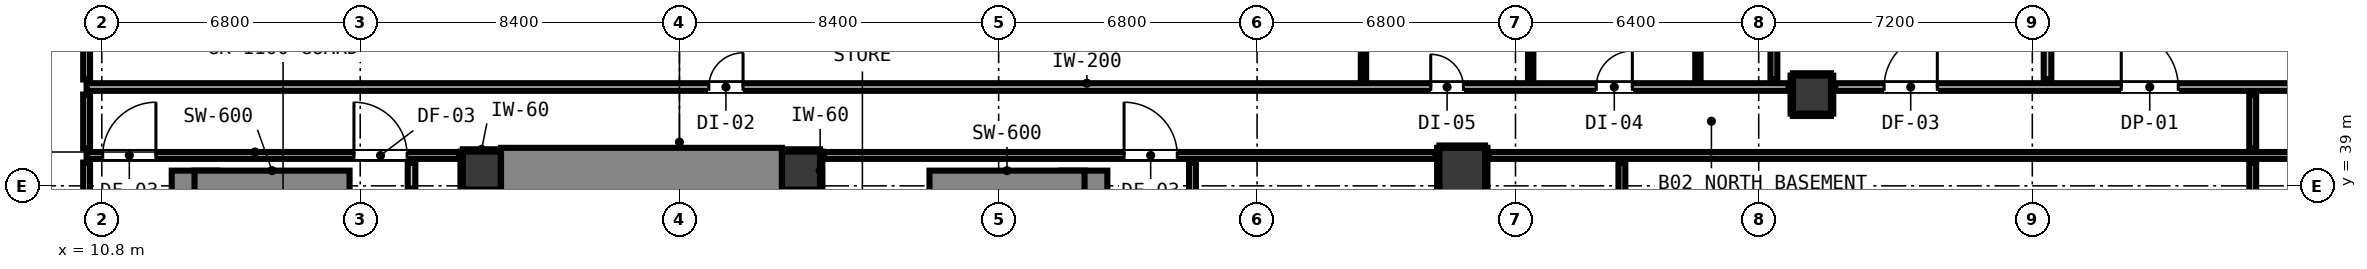
"""IFC4 building model, lengths in metres.
Left out: names, types, materials, properties, quantities, classifications, styles, units other than length and angle.
Written with IfcOpenShell. Run it as: python <this file> out.ifc"""

import sys

from ifc_helpers import new_model, si_unit, direction, frame, frame_2d, origin, origin_2d, place, context, subcontext, project, spatial, rectangle, circle, extrude, element, fill, save


model = new_model("IFC4")
c1 = context("Model", 3, precision=1e-05, world=origin(), true_north=direction((0.0, 1.0)))
c2 = subcontext(c1, "Body", "Model", "MODEL_VIEW")
j1 = project(units=[si_unit("LENGTHUNIT", "METRE"), si_unit("PLANEANGLEUNIT", "RADIAN")], contexts=[c1])
p1 = place(None, origin())
s1 = spatial("IfcSite", under=j1, at=p1, CompositionType="ELEMENT")
p2 = place(p1, origin())
s2 = spatial("IfcBuilding", under=s1, at=p2, CompositionType="ELEMENT")
p3 = place(p2, frame((0.0, 0.0, -8.8)))
s3 = spatial("IfcBuildingStorey", under=s2, at=p3, CompositionType="ELEMENT", Elevation=-8.8)
for number, where, z_axis, x_axis in (
    (1, (20.8, 39.4, 0.0), (0.0, 0.0, 1.0), (1.0, 0.0, 0.0)),
    (2, (29.2, 39.4, 0.0), (0.0, 0.0, 1.0), (1.0, 0.0, 0.0)),
):
    element("IfcColumn", number, at=place(p3, frame(where, z_axis=z_axis, x_axis=x_axis)), inside=s3, PredefinedType="COLUMN", context=c2, shape_type="SweptSolid", body=[
        extrude(rectangle(XDim=1.0, YDim=1.0, at=origin_2d()), origin(), (0.0, 0.0, 1.0), 4.4),
    ])
p4 = place(p3, frame((13.24, 31.205, 0.0), z_axis=(0.0, 0.0, 1.0), x_axis=(0.0, 1.0, 0.0)))
e3 = element("IfcWall", 3, at=p4, inside=s3, PredefinedType="SHEAR", context=c2, shape_type="SweptSolid", body=[
    extrude(rectangle(XDim=8.195, YDim=1.2, at=frame_2d((4.097, 0.0))), origin(), (0.0, 0.0, 1.0), 4.4),
])
p5 = place(p3, frame((13.24, 39.1, 0.0), z_axis=(0.0, 0.0, 1.0), x_axis=(1.0, 0.0, 0.0)))
e4 = element("IfcWall", 4, at=p5, inside=s3, PredefinedType="SHEAR", context=c2, shape_type="SweptSolid", body=[
    extrude(rectangle(XDim=4.08, YDim=0.6, at=frame_2d((2.04, 0.0))), origin(), (0.0, 0.0, 1.0), 4.4),
])
p6 = place(p3, frame((36.66, 31.205, 0.0), z_axis=(0.0, 0.0, 1.0), x_axis=(0.0, 1.0, 0.0)))
e5 = element("IfcWall", 5, at=p6, inside=s3, PredefinedType="SHEAR", context=c2, shape_type="SweptSolid", body=[
    extrude(rectangle(XDim=8.195, YDim=1.2, at=frame_2d((4.097, 0.0))), origin(), (0.0, 0.0, 1.0), 4.4),
])
p7 = place(p3, frame((32.58, 39.1, 0.0), z_axis=(0.0, 0.0, 1.0), x_axis=(1.0, 0.0, 0.0)))
e6 = element("IfcWall", 6, at=p7, inside=s3, PredefinedType="SHEAR", context=c2, shape_type="SweptSolid", body=[
    extrude(rectangle(XDim=4.08, YDim=0.6, at=frame_2d((2.04, 0.0))), origin(), (0.0, 0.0, 1.0), 4.4),
])
p8 = place(p3, frame((21.305, 39.4, 0.0), z_axis=(0.0, 0.0, 1.0), x_axis=(1.0, 0.0, 0.0)))
e7 = element("IfcWall", 7, at=p8, inside=s3, PredefinedType="SHEAR", context=c2, shape_type="SweptSolid", body=[
    extrude(rectangle(XDim=7.39, YDim=1.2, at=frame_2d((3.695, 0.0))), origin(), (0.0, 0.0, 1.0), 4.4),
])
p9 = place(p3, frame((46.6, 39.4, 0.0), z_axis=(0.0, 0.0, 1.0), x_axis=(1.0, 0.0, 0.0)))
e8 = element("IfcColumn", 8, at=p9, inside=s3, PredefinedType="COLUMN", context=c2, shape_type="SweptSolid", body=[
    extrude(circle(Radius=0.6, at=origin_2d()), origin(), (0.0, 0.0, 1.0), 4.4),
])
p10 = place(p3, frame((55.8, 41.4, 0.0), z_axis=(0.0, 0.0, 1.0), x_axis=(1.0, 0.0, 0.0)))
e9 = element("IfcColumn", 9, at=p10, inside=s3, PredefinedType="COLUMN", context=c2, shape_type="SweptSolid", body=[
    extrude(rectangle(XDim=1.0, YDim=1.0, at=origin_2d()), origin(), (0.0, 0.0, 1.0), 4.4),
])
p11 = place(p3, frame((10.4, 41.6, 0.0), z_axis=(0.0, 0.0, 1.0), x_axis=(1.0, 0.0, 0.0)))
e10 = element("IfcWall", 10, at=p11, inside=s3, PredefinedType="PARTITIONING", context=c2, shape_type="SweptSolid", body=[
    extrude(rectangle(XDim=44.788, YDim=0.2, at=frame_2d((22.394, 0.0))), origin(), (0.0, 0.0, 1.0), 4.1),
])
p12 = place(p11, frame((16.374, 0.0, 0.0)))
e11 = element("IfcOpeningElement", 11, at=p12, cuts=e10, PredefinedType="OPENING", context=c2, shape_type="SweptSolid", body=[
    extrude(rectangle(XDim=0.9, YDim=2.1, at=frame_2d((0.45, 1.05))), frame((0.0, 0.11, 0.0), z_axis=(0.0, -1.0, 0.0), x_axis=(1.0, 0.0, 0.0)), (0.0, 0.0, 1.0), 0.22),
])
p13 = place(p11, frame((35.37, 0.0, 0.0)))
e12 = element("IfcOpeningElement", 12, at=p13, cuts=e10, PredefinedType="OPENING", context=c2, shape_type="SweptSolid", body=[
    extrude(rectangle(XDim=0.86, YDim=2.02, at=frame_2d((0.43, 1.01))), frame((0.0, 0.11, 0.0), z_axis=(0.0, -1.0, 0.0), x_axis=(1.0, 0.0, 0.0)), (0.0, 0.0, 1.0), 0.22),
])
p14 = place(p11, frame((39.725, 0.0, 0.0)))
e13 = element("IfcOpeningElement", 13, at=p14, cuts=e10, PredefinedType="OPENING", context=c2, shape_type="SweptSolid", body=[
    extrude(rectangle(XDim=0.95, YDim=2.1, at=frame_2d((0.475, 1.05))), frame((0.0, 0.11, 0.0), z_axis=(0.0, -1.0, 0.0), x_axis=(1.0, 0.0, 0.0)), (0.0, 0.0, 1.0), 0.22),
])
p15 = place(p3, frame((56.412, 41.6, 0.0), z_axis=(0.0, 0.0, 1.0), x_axis=(1.0, 0.0, 0.0)))
e14 = element("IfcWall", 14, at=p15, inside=s3, PredefinedType="PARTITIONING", context=c2, shape_type="SweptSolid", body=[
    extrude(rectangle(XDim=24.776, YDim=0.2, at=frame_2d((12.388, 0.0))), origin(), (0.0, 0.0, 1.0), 4.1),
])
p16 = place(p15, frame((1.288, 0.0, 0.0)))
e15 = element("IfcOpeningElement", 15, at=p16, cuts=e14, PredefinedType="OPENING", context=c2, shape_type="SweptSolid", body=[
    extrude(rectangle(XDim=1.4, YDim=2.15, at=frame_2d((0.7, 1.075))), frame((0.0, 0.11, 0.0), z_axis=(0.0, -1.0, 0.0), x_axis=(1.0, 0.0, 0.0)), (0.0, 0.0, 1.0), 0.22),
])
p17 = place(p15, frame((7.528, 0.0, 0.0)))
e16 = element("IfcOpeningElement", 16, at=p17, cuts=e14, PredefinedType="OPENING", context=c2, shape_type="SweptSolid", body=[
    extrude(rectangle(XDim=1.5, YDim=2.15, at=frame_2d((0.75, 1.075))), frame((0.0, 0.11, 0.0), z_axis=(0.0, -1.0, 0.0), x_axis=(1.0, 0.0, 0.0)), (0.0, 0.0, 1.0), 0.22),
])
p18 = place(p3, frame((10.4, 39.8, 0.0), z_axis=(0.0, 0.0, 1.0), x_axis=(1.0, 0.0, 0.0)))
e17 = element("IfcWall", 17, at=p18, inside=s3, PredefinedType="PARTITIONING", context=c2, shape_type="SweptSolid", body=[
    extrude(rectangle(XDim=9.798, YDim=0.18, at=frame_2d((4.899, 0.0))), origin(), (0.0, 0.0, 1.0), 3.335),
])
p19 = place(p18, frame((7.035, 0.0, 0.0)))
e18 = element("IfcOpeningElement", 18, at=p19, cuts=e17, PredefinedType="OPENING", context=c2, shape_type="SweptSolid", body=[
    extrude(rectangle(XDim=1.4, YDim=2.15, at=frame_2d((0.7, 1.075))), frame((0.0, 0.1, 0.0), z_axis=(0.0, -1.0, 0.0), x_axis=(1.0, 0.0, 0.0)), (0.0, 0.0, 1.0), 0.2),
])
p20 = place(p18, frame((0.424, 0.0, 0.0)))
e19 = element("IfcOpeningElement", 19, at=p20, cuts=e17, PredefinedType="OPENING", context=c2, shape_type="SweptSolid", body=[
    extrude(rectangle(XDim=1.4, YDim=2.15, at=frame_2d((0.7, 1.075))), frame((0.0, 0.1, 0.0), z_axis=(0.0, -1.0, 0.0), x_axis=(1.0, 0.0, 0.0)), (0.0, 0.0, 1.0), 0.2),
])
p21 = place(p3, frame((29.802, 39.8, 0.0), z_axis=(0.0, 0.0, 1.0), x_axis=(1.0, 0.0, 0.0)))
e20 = element("IfcWall", 20, at=p21, inside=s3, PredefinedType="PARTITIONING", context=c2, shape_type="SweptSolid", body=[
    extrude(rectangle(XDim=16.096, YDim=0.18, at=frame_2d((8.048, 0.0))), origin(), (0.0, 0.0, 1.0), 3.335),
])
p22 = place(p21, frame((7.898, 0.0, 0.0)))
e21 = element("IfcOpeningElement", 21, at=p22, cuts=e20, PredefinedType="OPENING", context=c2, shape_type="SweptSolid", body=[
    extrude(rectangle(XDim=1.4, YDim=2.15, at=frame_2d((0.7, 1.075))), frame((0.0, 0.1, 0.0), z_axis=(0.0, -1.0, 0.0), x_axis=(1.0, 0.0, 0.0)), (0.0, 0.0, 1.0), 0.2),
])
p23 = place(p3, frame((47.302, 39.8, 0.0), z_axis=(0.0, 0.0, 1.0), x_axis=(1.0, 0.0, 0.0)))
e22 = element("IfcWall", 22, at=p23, inside=s3, PredefinedType="PARTITIONING", context=c2, shape_type="SweptSolid", body=[
    extrude(rectangle(XDim=23.098, YDim=0.18, at=frame_2d((11.549, 0.0))), origin(), (0.0, 0.0, 1.0), 4.1),
])
p24 = place(p3, frame((18.95, 38.928, 0.0), z_axis=(0.0, 0.0, 1.0), x_axis=(0.0, 1.0, 0.0)))
e23 = element("IfcWall", 23, at=p24, inside=s3, PredefinedType="PARTITIONING", context=c2, shape_type="SweptSolid", body=[
    extrude(rectangle(XDim=0.674, YDim=0.2, at=frame_2d((0.337, 0.0))), origin(), (0.0, 0.0, 1.0), 4.1),
])
p25 = place(p3, frame((62.0, 41.808, 0.0), z_axis=(0.0, 0.0, 1.0), x_axis=(0.0, 1.0, 0.0)))
e24 = element("IfcWall", 24, at=p25, inside=s3, PredefinedType="PARTITIONING", context=c2, shape_type="SweptSolid", body=[
    extrude(rectangle(XDim=2.442, YDim=0.2, at=frame_2d((1.221, 0.0))), origin(), (0.0, 0.0, 1.0), 4.1),
])
p26 = place(p3, frame((10.4, 21.818, 0.0), z_axis=(0.0, 0.0, 1.0), x_axis=(0.0, 1.0, 0.0)))
e25 = element("IfcWall", 25, at=p26, inside=s3, PredefinedType="PARTITIONING", context=c2, shape_type="SweptSolid", body=[
    extrude(rectangle(XDim=17.794, YDim=0.18, at=frame_2d((8.897, 0.0))), origin(), (0.0, 0.0, 1.0), 4.1),
])
p27 = place(p3, frame((10.4, 39.988, 0.0), z_axis=(0.0, 0.0, 1.0), x_axis=(0.0, 1.0, 0.0)))
e26 = element("IfcWall", 26, at=p27, inside=s3, PredefinedType="PARTITIONING", context=c2, shape_type="SweptSolid", body=[
    extrude(rectangle(XDim=1.414, YDim=0.18, at=frame_2d((0.707, 0.0))), origin(), (0.0, 0.0, 1.0), 4.1),
])
p28 = place(p3, frame((10.4, 41.798, 0.0), z_axis=(0.0, 0.0, 1.0), x_axis=(0.0, 1.0, 0.0)))
e27 = element("IfcWall", 27, at=p28, inside=s3, PredefinedType="PARTITIONING", context=c2, shape_type="SweptSolid", body=[
    extrude(rectangle(XDim=15.844, YDim=0.18, at=frame_2d((7.922, 0.0))), origin(), (0.0, 0.0, 1.0), 4.1),
])
p29 = place(p3, frame((39.5, 21.818, 0.0), z_axis=(0.0, 0.0, 1.0), x_axis=(0.0, 1.0, 0.0)))
e28 = element("IfcWall", 28, at=p29, inside=s3, PredefinedType="PARTITIONING", context=c2, shape_type="SweptSolid", body=[
    extrude(rectangle(XDim=17.794, YDim=0.18, at=frame_2d((8.897, 0.0))), origin(), (0.0, 0.0, 1.0), 4.1),
])
p30 = place(p3, frame((50.8, 36.798, 0.0), z_axis=(0.0, 0.0, 1.0), x_axis=(0.0, 1.0, 0.0)))
e29 = element("IfcWall", 29, at=p30, inside=s3, PredefinedType="PARTITIONING", context=c2, shape_type="SweptSolid", body=[
    extrude(rectangle(XDim=2.814, YDim=0.18, at=frame_2d((1.407, 0.0))), origin(), (0.0, 0.0, 1.0), 4.1),
])
p31 = place(p3, frame((54.8, 41.798, 0.0), z_axis=(0.0, 0.0, 1.0), x_axis=(0.0, 1.0, 0.0)))
e30 = element("IfcWall", 30, at=p31, inside=s3, PredefinedType="PARTITIONING", context=c2, shape_type="SweptSolid", body=[
    extrude(rectangle(XDim=2.534, YDim=0.18, at=frame_2d((1.267, 0.0))), origin(), (0.0, 0.0, 1.0), 4.1),
])
p32 = place(p3, frame((67.4, 21.818, 0.0), z_axis=(0.0, 0.0, 1.0), x_axis=(0.0, 1.0, 0.0)))
e31 = element("IfcWall", 31, at=p32, inside=s3, PredefinedType="PARTITIONING", context=c2, shape_type="SweptSolid", body=[
    extrude(rectangle(XDim=17.794, YDim=0.18, at=frame_2d((8.897, 0.0))), origin(), (0.0, 0.0, 1.0), 4.1),
])
p33 = place(p3, frame((67.4, 39.988, 0.0), z_axis=(0.0, 0.0, 1.0), x_axis=(0.0, 1.0, 0.0)))
e32 = element("IfcWall", 32, at=p33, inside=s3, PredefinedType="PARTITIONING", context=c2, shape_type="SweptSolid", body=[
    extrude(rectangle(XDim=1.414, YDim=0.18, at=frame_2d((0.707, 0.0))), origin(), (0.0, 0.0, 1.0), 4.1),
])
for number, where, z_axis, x_axis in (
    (33, (44.0, 41.778, 0.0), (0.0, 0.0, 1.0), (0.0, 1.0, 0.0)),
    (34, (48.4, 41.778, 0.0), (0.0, 0.0, 1.0), (0.0, 1.0, 0.0)),
    (35, (52.8, 41.778, 0.0), (0.0, 0.0, 1.0), (0.0, 1.0, 0.0)),
):
    element("IfcWall", number, at=place(p3, frame(where, z_axis=z_axis, x_axis=x_axis)), inside=s3, PredefinedType="PARTITIONING", context=c2, shape_type="SweptSolid", body=[
        extrude(rectangle(XDim=4.274, YDim=0.14, at=frame_2d((2.137, 0.0))), origin(), (0.0, 0.0, 1.0), 4.1),
    ])
for number, where, z_axis, x_axis in (
    (36, (20.3, 38.868, 0.0), (0.0, 0.0, 1.0), (1.0, 0.0, 0.0)),
    (37, (20.3, 39.932, 0.0), (0.0, 0.0, 1.0), (1.0, 0.0, 0.0)),
):
    element("IfcWall", number, at=place(p3, frame(where, z_axis=z_axis, x_axis=x_axis)), inside=s3, PredefinedType="PARTITIONING", context=c2, shape_type="SweptSolid", body=[
        extrude(rectangle(XDim=0.99, YDim=0.06, at=frame_2d((0.495, 0.0))), origin(), (0.0, 0.0, 1.0), 1.45),
    ])
p34 = place(p3, frame((20.268, 38.9, 0.0), z_axis=(0.0, 0.0, 1.0), x_axis=(0.0, 1.0, 0.0)))
e38 = element("IfcWall", 38, at=p34, inside=s3, PredefinedType="PARTITIONING", context=c2, shape_type="SweptSolid", body=[
    extrude(rectangle(XDim=1.0, YDim=0.06, at=frame_2d((0.5, 0.0))), origin(), (0.0, 0.0, 1.0), 1.45),
])
for number, where, z_axis, x_axis in (
    (39, (28.71, 38.868, 0.0), (0.0, 0.0, 1.0), (1.0, 0.0, 0.0)),
    (40, (28.71, 39.932, 0.0), (0.0, 0.0, 1.0), (1.0, 0.0, 0.0)),
):
    element("IfcWall", number, at=place(p3, frame(where, z_axis=z_axis, x_axis=x_axis)), inside=s3, PredefinedType="PARTITIONING", context=c2, shape_type="SweptSolid", body=[
        extrude(rectangle(XDim=0.99, YDim=0.06, at=frame_2d((0.495, 0.0))), origin(), (0.0, 0.0, 1.0), 1.45),
    ])
p35 = place(p3, frame((29.732, 38.9, 0.0), z_axis=(0.0, 0.0, 1.0), x_axis=(0.0, 1.0, 0.0)))
e41 = element("IfcWall", 41, at=p35, inside=s3, PredefinedType="PARTITIONING", context=c2, shape_type="SweptSolid", body=[
    extrude(rectangle(XDim=1.0, YDim=0.06, at=frame_2d((0.5, 0.0))), origin(), (0.0, 0.0, 1.0), 1.45),
])
for number, where, z_axis, x_axis in (
    (42, (46.0, 40.032, 0.0), (0.0, 0.0, 1.0), (1.0, 0.0, 0.0)),
    (43, (45.968, 38.8, 0.0), (0.0, 0.0, 1.0), (0.0, 1.0, 0.0)),
    (44, (47.232, 38.8, 0.0), (0.0, 0.0, 1.0), (0.0, 1.0, 0.0)),
):
    element("IfcWall", number, at=place(p3, frame(where, z_axis=z_axis, x_axis=x_axis)), inside=s3, PredefinedType="PARTITIONING", context=c2, shape_type="SweptSolid", body=[
        extrude(rectangle(XDim=1.2, YDim=0.06, at=frame_2d((0.6, 0.0))), origin(), (0.0, 0.0, 1.0), 1.45),
    ])
for number, where, z_axis, x_axis in (
    (45, (55.3, 40.868, 0.0), (0.0, 0.0, 1.0), (1.0, 0.0, 0.0)),
    (46, (55.3, 41.932, 0.0), (0.0, 0.0, 1.0), (1.0, 0.0, 0.0)),
    (47, (55.268, 40.9, 0.0), (0.0, 0.0, 1.0), (0.0, 1.0, 0.0)),
    (48, (56.332, 40.9, 0.0), (0.0, 0.0, 1.0), (0.0, 1.0, 0.0)),
):
    element("IfcWall", number, at=place(p3, frame(where, z_axis=z_axis, x_axis=x_axis)), inside=s3, PredefinedType="PARTITIONING", context=c2, shape_type="SweptSolid", body=[
        extrude(rectangle(XDim=1.0, YDim=0.06, at=frame_2d((0.5, 0.0))), origin(), (0.0, 0.0, 1.0), 1.45),
    ])
p36 = place(p19, origin())
e49 = element("IfcDoor", 49, at=p36, inside=s3, OperationType="SINGLE_SWING_LEFT", PredefinedType="DOOR", context=c2, shape_type="SweptSolid", body=[
    extrude(rectangle(XDim=1.4, YDim=2.15, at=frame_2d((0.7, 1.075))), frame((0.0, 0.025, 0.0), z_axis=(0.0, -1.0, 0.0), x_axis=(1.0, 0.0, 0.0)), (0.0, 0.0, 1.0), 0.05),
])
fill(e18, e49)
p37 = place(p20, origin())
e50 = element("IfcDoor", 50, at=p37, inside=s3, OperationType="SINGLE_SWING_RIGHT", PredefinedType="DOOR", context=c2, shape_type="SweptSolid", body=[
    extrude(rectangle(XDim=1.4, YDim=2.15, at=frame_2d((0.7, 1.075))), frame((0.0, 0.025, 0.0), z_axis=(0.0, -1.0, 0.0), x_axis=(1.0, 0.0, 0.0)), (0.0, 0.0, 1.0), 0.05),
])
fill(e19, e50)
p38 = place(p22, origin())
e51 = element("IfcDoor", 51, at=p38, inside=s3, OperationType="SINGLE_SWING_LEFT", PredefinedType="DOOR", context=c2, shape_type="SweptSolid", body=[
    extrude(rectangle(XDim=1.4, YDim=2.15, at=frame_2d((0.7, 1.075))), frame((0.0, 0.025, 0.0), z_axis=(0.0, -1.0, 0.0), x_axis=(1.0, 0.0, 0.0)), (0.0, 0.0, 1.0), 0.05),
])
fill(e21, e51)
p39 = place(p16, origin())
e52 = element("IfcDoor", 52, at=p39, inside=s3, OperationType="SINGLE_SWING_RIGHT", PredefinedType="DOOR", context=c2, shape_type="SweptSolid", body=[
    extrude(rectangle(XDim=1.4, YDim=2.15, at=frame_2d((0.7, 1.075))), frame((0.0, 0.025, 0.0), z_axis=(0.0, -1.0, 0.0), x_axis=(1.0, 0.0, 0.0)), (0.0, 0.0, 1.0), 0.05),
])
fill(e15, e52)
p40 = place(p12, origin())
e53 = element("IfcDoor", 53, at=p40, inside=s3, OperationType="SINGLE_SWING_RIGHT", PredefinedType="DOOR", context=c2, shape_type="SweptSolid", body=[
    extrude(rectangle(XDim=0.9, YDim=2.1, at=frame_2d((0.45, 1.05))), frame((0.0, 0.025, 0.0), z_axis=(0.0, -1.0, 0.0), x_axis=(1.0, 0.0, 0.0)), (0.0, 0.0, 1.0), 0.05),
])
fill(e11, e53)
p41 = place(p13, origin())
e54 = element("IfcDoor", 54, at=p41, inside=s3, OperationType="SINGLE_SWING_LEFT", PredefinedType="DOOR", context=c2, shape_type="SweptSolid", body=[
    extrude(rectangle(XDim=0.86, YDim=2.02, at=frame_2d((0.43, 1.01))), frame((0.0, 0.025, 0.0), z_axis=(0.0, -1.0, 0.0), x_axis=(1.0, 0.0, 0.0)), (0.0, 0.0, 1.0), 0.05),
])
fill(e12, e54)
p42 = place(p14, origin())
e55 = element("IfcDoor", 55, at=p42, inside=s3, OperationType="SINGLE_SWING_RIGHT", PredefinedType="DOOR", context=c2, shape_type="SweptSolid", body=[
    extrude(rectangle(XDim=0.95, YDim=2.1, at=frame_2d((0.475, 1.05))), frame((0.0, 0.025, 0.0), z_axis=(0.0, -1.0, 0.0), x_axis=(1.0, 0.0, 0.0)), (0.0, 0.0, 1.0), 0.05),
])
fill(e13, e55)
p43 = place(p17, origin())
e56 = element("IfcDoor", 56, at=p43, inside=s3, OperationType="SINGLE_SWING_LEFT", PredefinedType="DOOR", context=c2, shape_type="SweptSolid", body=[
    extrude(rectangle(XDim=1.5, YDim=2.15, at=frame_2d((0.75, 1.075))), frame((0.0, 0.025, 0.0), z_axis=(0.0, -1.0, 0.0), x_axis=(1.0, 0.0, 0.0)), (0.0, 0.0, 1.0), 0.05),
])
fill(e16, e56)
save(model, sys.argv[1])
